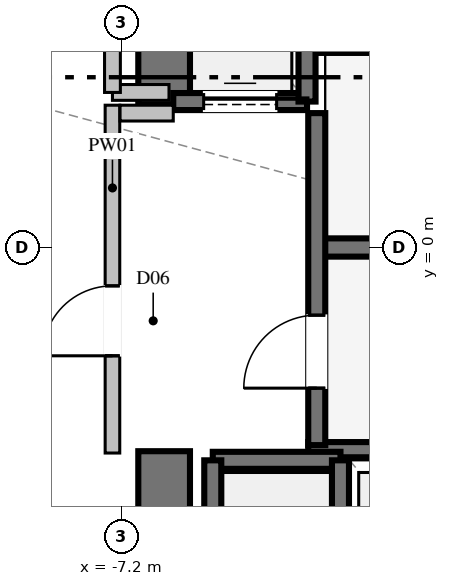
"""IFC4 building model, lengths in metres.
Left out: names, types, materials, properties, quantities, classifications, styles, units other than length and angle.
Written with IfcOpenShell. Run it as: python <this file> out.ifc"""

import sys

from ifc_helpers import new_model, si_unit, direction, frame, frame_2d, origin, place, context, subcontext, project, spatial, rectangle, extrude, element, fill, save


model = new_model("IFC4")
c1 = context("Model", 3, precision=1e-05, world=origin(), true_north=direction((0.0, 1.0)))
c2 = subcontext(c1, "Body", "Model", "MODEL_VIEW")
j1 = project(units=[si_unit("LENGTHUNIT", "METRE"), si_unit("PLANEANGLEUNIT", "RADIAN")], contexts=[c1])
p1 = place(None, origin())
s1 = spatial("IfcSite", under=j1, at=p1, CompositionType="ELEMENT")
p2 = place(p1, origin())
s2 = spatial("IfcBuilding", under=s1, at=p2, CompositionType="ELEMENT")
p3 = place(p2, origin())
s3 = spatial("IfcBuildingStorey", under=s2, at=p3, CompositionType="ELEMENT", Elevation=0.0)
p4 = place(p3, frame((-3.99, 0.0, 0.0), z_axis=(0.0, 0.0, 1.0), x_axis=(1.0, 0.0, 0.0)))
e1 = element("IfcWall", 1, at=p4, inside=s3, PredefinedType="SHEAR", context=c2, shape_type="SweptSolid", body=[
    extrude(rectangle(XDim=7.98, YDim=0.3, at=frame_2d((3.99, 0.0))), origin(), (0.0, 0.0, 1.0), 7.2),
])
for number, where, z_axis, x_axis in (
    (2, (-4.13, -3.325, 0.0), (0.0, 0.0, 1.0), (1.0, 0.0, 0.0)),
    (3, (-4.13, 3.325, 0.0), (0.0, 0.0, 1.0), (1.0, 0.0, 0.0)),
):
    element("IfcWall", number, at=place(p3, frame(where, z_axis=z_axis, x_axis=x_axis)), inside=s3, PredefinedType="SOLIDWALL", context=c2, shape_type="SweptSolid", body=[
        extrude(rectangle(XDim=8.26, YDim=0.25, at=frame_2d((4.13, 0.0))), origin(), (0.0, 0.0, 1.0), 7.2),
    ])
p5 = place(p3, frame((-6.5, 2.35, 0.0), z_axis=(0.0, 0.0, 1.0), x_axis=(0.0, 1.0, 0.0)))
e4 = element("IfcWall", 4, at=p5, inside=s3, PredefinedType="SHEAR", context=c2, shape_type="SweptSolid", body=[
    extrude(rectangle(XDim=4.175, YDim=0.85, at=frame_2d((2.087, 0.0))), origin(), (0.0, 0.0, 1.0), 7.2),
])
p6 = place(p3, frame((-6.5, -6.525, 0.0), z_axis=(0.0, 0.0, 1.0), x_axis=(0.0, 1.0, 0.0)))
e5 = element("IfcWall", 5, at=p6, inside=s3, PredefinedType="SHEAR", context=c2, shape_type="SweptSolid", body=[
    extrude(rectangle(XDim=3.175, YDim=0.85, at=frame_2d((1.587, 0.0))), origin(), (0.0, 0.0, 1.0), 7.2),
])
p7 = place(p3, frame((-3.6, -3.5, 0.0), z_axis=(0.0, 0.0, 1.0), x_axis=(-1.0, 0.0, 0.0)))
e6 = element("IfcWall", 6, at=p7, inside=s3, PredefinedType="SOLIDWALL", context=c2, shape_type="SweptSolid", body=[
    extrude(rectangle(XDim=2.1, YDim=0.28, at=frame_2d((1.05, 0.0))), origin(), (0.0, 0.0, 1.0), 6.84),
])
for number, where, z_axis, x_axis in (
    (7, (-5.7, -3.5, 0.0), (0.0, 0.0, 1.0), (0.0, -1.0, 0.0)),
    (8, (-3.6, -6.0, 0.0), (0.0, 0.0, 1.0), (0.0, 1.0, 0.0)),
):
    element("IfcWall", number, at=place(p3, frame(where, z_axis=z_axis, x_axis=x_axis)), inside=s3, PredefinedType="SOLIDWALL", context=c2, shape_type="SweptSolid", body=[
        extrude(rectangle(XDim=2.5, YDim=0.28, at=frame_2d((1.25, 0.0))), origin(), (0.0, 0.0, 1.0), 6.84),
    ])
p8 = place(p3, frame((-6.35, 2.4, 0.0), z_axis=(0.0, 0.0, 1.0), x_axis=(1.0, 0.0, 0.0)))
e9 = element("IfcWall", 9, at=p8, inside=s3, PredefinedType="SOLIDWALL", context=c2, shape_type="SweptSolid", body=[
    extrude(rectangle(XDim=2.2, YDim=0.28, at=frame_2d((1.1, 0.0))), origin(), (0.0, 0.0, 1.0), 6.84),
])
p9 = place(p8, frame((0.5, 0.0, 0.0)))
e10 = element("IfcOpeningElement", 10, at=p9, cuts=e9, PredefinedType="OPENING", context=c2, shape_type="SweptSolid", body=[
    extrude(rectangle(XDim=1.2, YDim=2.2, at=frame_2d((0.6, 1.1))), frame((0.0, 0.15, 0.0), z_axis=(0.0, -1.0, 0.0), x_axis=(1.0, 0.0, 0.0)), (0.0, 0.0, 1.0), 0.3),
])
p10 = place(p3, frame((-4.15, 2.4, 0.0), z_axis=(0.0, 0.0, 1.0), x_axis=(0.0, 1.0, 0.0)))
e11 = element("IfcWall", 11, at=p10, inside=s3, PredefinedType="SOLIDWALL", context=c2, shape_type="SweptSolid", body=[
    extrude(rectangle(XDim=2.7, YDim=0.28, at=frame_2d((1.35, 0.0))), origin(), (0.0, 0.0, 1.0), 6.84),
])
p11 = place(p3, frame((-3.99, -3.25, 0.0), z_axis=(0.0, 0.0, 1.0), x_axis=(0.0, 1.0, 0.0)))
e12 = element("IfcWall", 12, at=p11, inside=s3, PredefinedType="SOLIDWALL", context=c2, shape_type="SweptSolid", body=[
    extrude(rectangle(XDim=5.46, YDim=0.28, at=frame_2d((2.73, 0.0))), origin(), (0.0, 0.0, 1.0), 6.84),
])
p12 = place(p11, frame((0.937, 0.0, 0.0)))
e13 = element("IfcOpeningElement", 13, at=p12, cuts=e12, PredefinedType="OPENING", context=c2, shape_type="SweptSolid", body=[
    extrude(rectangle(XDim=1.2, YDim=2.2, at=frame_2d((0.6, 1.1))), frame((0.0, 0.15, 0.0), z_axis=(0.0, -1.0, 0.0), x_axis=(1.0, 0.0, 0.0)), (0.0, 0.0, 1.0), 0.3),
])
p13 = place(p3, frame((-7.35, -3.38, 0.0), z_axis=(0.0, 0.0, 1.0), x_axis=(0.0, 1.0, 0.0)))
e14 = element("IfcWall", 14, at=p13, inside=s3, PredefinedType="PARTITIONING", context=c2, shape_type="SweptSolid", body=[
    extrude(rectangle(XDim=5.72, YDim=0.24, at=frame_2d((2.86, 0.0))), origin(), (0.0, 0.0, 1.0), 5.725),
])
p14 = place(p13, frame((1.599, 0.0, 0.0)))
e15 = element("IfcOpeningElement", 15, at=p14, cuts=e14, PredefinedType="OPENING", context=c2, shape_type="SweptSolid", body=[
    extrude(rectangle(XDim=1.15, YDim=2.2, at=frame_2d((0.575, 1.1))), frame((0.0, 0.13, 0.0), z_axis=(0.0, -1.0, 0.0), x_axis=(1.0, 0.0, 0.0)), (0.0, 0.0, 1.0), 0.26),
])
p15 = place(p3, frame((-7.225, 2.21, 0.0), z_axis=(0.0, 0.0, 1.0), x_axis=(1.0, 0.0, 0.0)))
e16 = element("IfcWall", 16, at=p15, inside=s3, PredefinedType="PARTITIONING", context=c2, shape_type="SweptSolid", body=[
    extrude(rectangle(XDim=0.875, YDim=0.26, at=frame_2d((0.438, 0.0))), origin(), (0.0, 0.0, 1.0), 6.84),
])
p16 = place(p3, frame((-7.35, 2.55, 0.0), z_axis=(0.0, 0.0, 1.0), x_axis=(1.0, 0.0, 0.0)))
e17 = element("IfcWall", 17, at=p16, inside=s3, PredefinedType="PARTITIONING", context=c2, shape_type="SweptSolid", body=[
    extrude(rectangle(XDim=0.93, YDim=0.26, at=frame_2d((0.465, 0.0))), origin(), (0.0, 0.0, 1.0), 6.84),
])
p17 = place(p3, frame((-7.35, 2.55, 0.0), z_axis=(0.0, 0.0, 1.0), x_axis=(0.0, 1.0, 0.0)))
e18 = element("IfcWall", 18, at=p17, inside=s3, PredefinedType="PARTITIONING", context=c2, shape_type="SweptSolid", body=[
    extrude(rectangle(XDim=2.4, YDim=0.26, at=frame_2d((1.2, 0.0))), origin(), (0.0, 0.0, 1.0), 5.725),
])
p18 = place(p17, frame((0.775, 0.0, 0.0)))
e19 = element("IfcOpeningElement", 19, at=p18, cuts=e18, PredefinedType="OPENING", context=c2, shape_type="SweptSolid", body=[
    extrude(rectangle(XDim=0.85, YDim=2.05, at=frame_2d((0.425, 1.025))), frame((0.0, 0.14, 0.0), z_axis=(0.0, -1.0, 0.0), x_axis=(1.0, 0.0, 0.0)), (0.0, 0.0, 1.0), 0.28),
])
p19 = place(p9, origin())
e20 = element("IfcDoor", 20, at=p19, inside=s3, OperationType="SLIDING_TO_LEFT", PredefinedType="DOOR", context=c2, shape_type="SweptSolid", body=[
    extrude(rectangle(XDim=1.2, YDim=2.2, at=frame_2d((0.6, 1.1))), frame((0.0, 0.025, 0.0), z_axis=(0.0, -1.0, 0.0), x_axis=(1.0, 0.0, 0.0)), (0.0, 0.0, 1.0), 0.05),
])
fill(e10, e20)
p20 = place(p12, origin())
e21 = element("IfcDoor", 21, at=p20, inside=s3, OperationType="SINGLE_SWING_LEFT", PredefinedType="DOOR", context=c2, shape_type="SweptSolid", body=[
    extrude(rectangle(XDim=1.2, YDim=2.2, at=frame_2d((0.6, 1.1))), frame((0.0, 0.025, 0.0), z_axis=(0.0, -1.0, 0.0), x_axis=(1.0, 0.0, 0.0)), (0.0, 0.0, 1.0), 0.05),
])
fill(e13, e21)
p21 = place(p14, origin())
e22 = element("IfcDoor", 22, at=p21, inside=s3, OperationType="SINGLE_SWING_LEFT", PredefinedType="DOOR", context=c2, shape_type="SweptSolid", body=[
    extrude(rectangle(XDim=1.15, YDim=2.2, at=frame_2d((0.575, 1.1))), frame((0.0, 0.025, 0.0), z_axis=(0.0, -1.0, 0.0), x_axis=(1.0, 0.0, 0.0)), (0.0, 0.0, 1.0), 0.05),
])
fill(e15, e22)
save(model, sys.argv[1])
